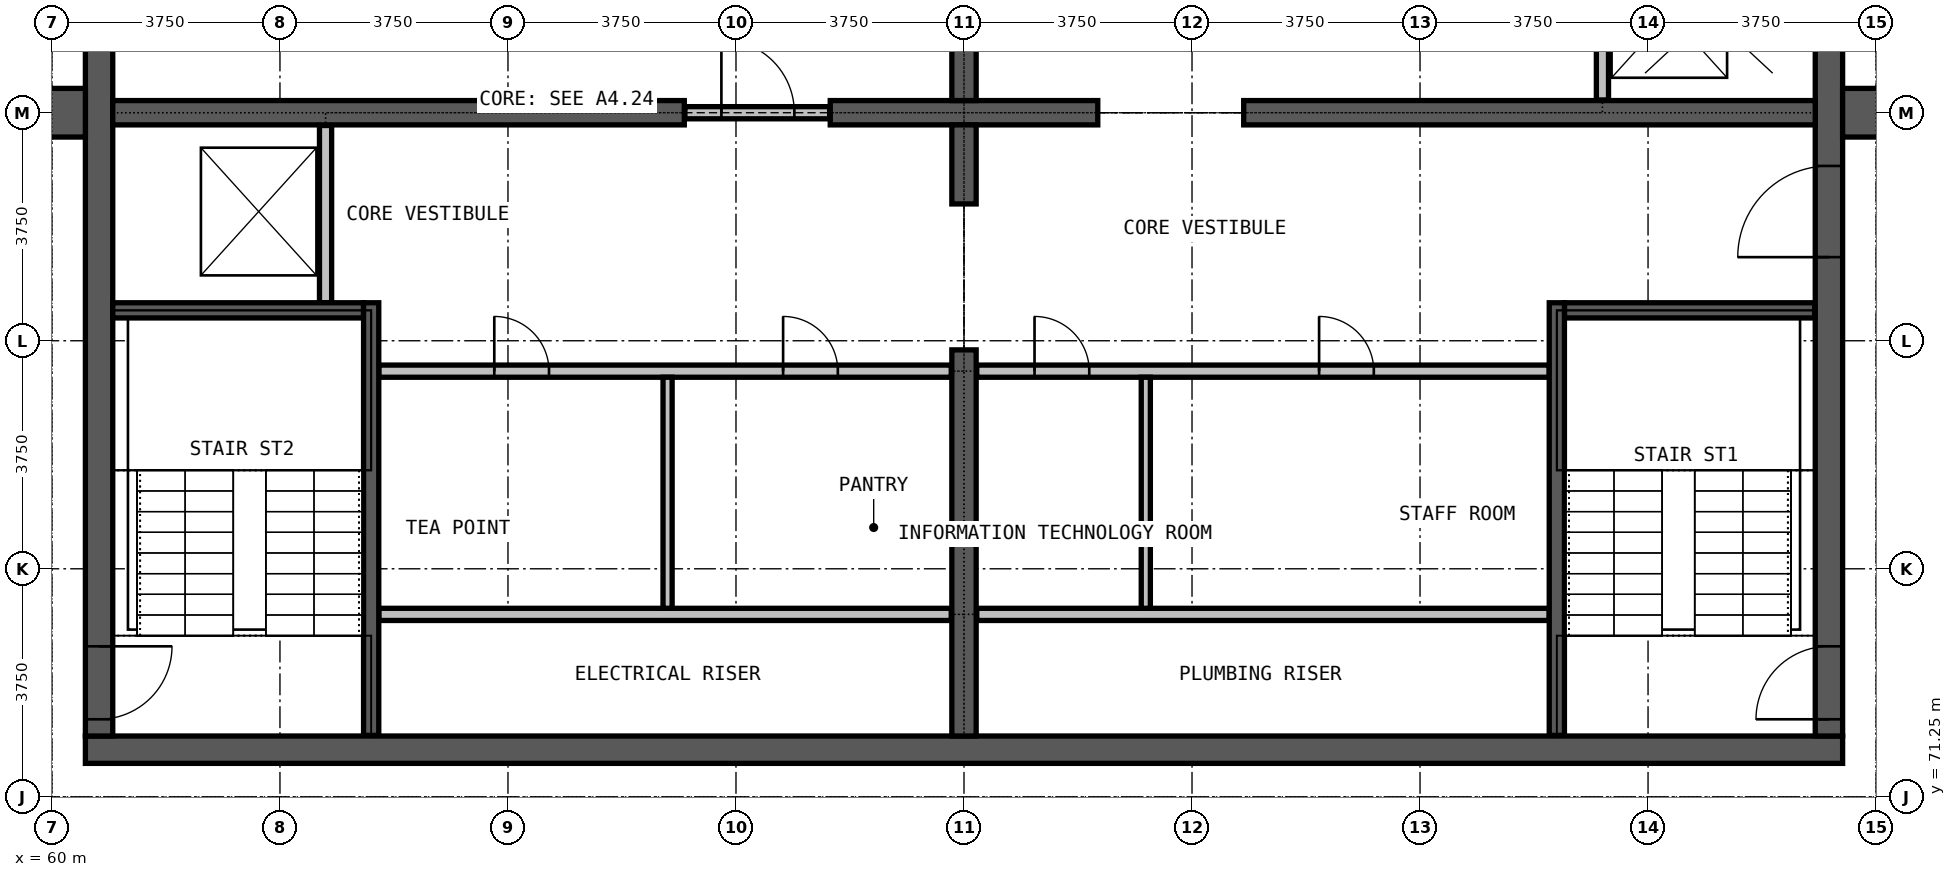
"""IFC4 building model, lengths in metres.
Left out: names, types, materials, properties, quantities, classifications, styles, units other than length and angle.
Written with IfcOpenShell. Run it as: python <this file> out.ifc"""

import sys

from ifc_helpers import new_model, si_unit, direction, frame, frame_2d, origin, place, context, subcontext, project, spatial, rectangle, extrude, element, fill, save


model = new_model("IFC4")
c1 = context("Model", 3, precision=1e-05, world=origin(), true_north=direction((0.0, 1.0)))
c2 = subcontext(c1, "Body", "Model", "MODEL_VIEW")
j1 = project(units=[si_unit("LENGTHUNIT", "METRE"), si_unit("PLANEANGLEUNIT", "RADIAN")], contexts=[c1])
p1 = place(None, origin())
s1 = spatial("IfcSite", under=j1, at=p1, CompositionType="ELEMENT")
p2 = place(p1, origin())
s2 = spatial("IfcBuilding", under=s1, at=p2, CompositionType="ELEMENT")
p3 = place(p2, frame((0.0, 0.0, 253.5)))
s3 = spatial("IfcBuildingStorey", under=s2, at=p3, CompositionType="ELEMENT", Elevation=253.5)
p4 = place(p3, frame((60.55, 72.025, 0.0), z_axis=(0.0, 0.0, 1.0), x_axis=(1.0, 0.0, 0.0)))
e1 = element("IfcWall", 1, at=p4, inside=s3, PredefinedType="SHEAR", context=c2, shape_type="SweptSolid", body=[
    extrude(rectangle(XDim=28.9, YDim=0.45, at=frame_2d((14.45, 0.0))), origin(), (0.0, 0.0, 1.0), 5.0),
])
p5 = place(p3, frame((89.225, 72.25, 0.0), z_axis=(0.0, 0.0, 1.0), x_axis=(0.0, 1.0, 0.0)))
e2 = element("IfcWall", 2, at=p5, inside=s3, PredefinedType="SHEAR", context=c2, shape_type="SweptSolid", body=[
    extrude(rectangle(XDim=20.5, YDim=0.45, at=frame_2d((10.25, 0.0))), origin(), (0.0, 0.0, 1.0), 5.0),
])
p6 = place(p5, frame((0.275, 0.0, 0.0)))
e3 = element("IfcOpeningElement", 3, at=p6, cuts=e2, PredefinedType="OPENING", context=c2, shape_type="SweptSolid", body=[
    extrude(rectangle(XDim=1.2, YDim=2.2, at=frame_2d((0.6, 1.1))), frame((0.0, 0.235, 0.0), z_axis=(0.0, -1.0, 0.0), x_axis=(1.0, 0.0, 0.0)), (0.0, 0.0, 1.0), 0.47),
])
p7 = place(p5, frame((13.775, 0.0, 0.0)))
e4 = element("IfcOpeningElement", 4, at=p7, cuts=e2, PredefinedType="OPENING", context=c2, shape_type="SweptSolid", body=[
    extrude(rectangle(XDim=1.2, YDim=2.2, at=frame_2d((0.6, 1.1))), frame((0.0, 0.235, 0.0), z_axis=(0.0, -1.0, 0.0), x_axis=(1.0, 0.0, 0.0)), (0.0, 0.0, 1.0), 0.47),
])
p8 = place(p5, frame((7.875, 0.0, 0.0)))
e5 = element("IfcOpeningElement", 5, at=p8, cuts=e2, PredefinedType="OPENING", context=c2, shape_type="SweptSolid", body=[
    extrude(rectangle(XDim=1.5, YDim=2.2, at=frame_2d((0.75, 1.1))), frame((0.0, 0.235, 0.0), z_axis=(0.0, -1.0, 0.0), x_axis=(1.0, 0.0, 0.0)), (0.0, 0.0, 1.0), 0.47),
])
p9 = place(p3, frame((60.775, 92.75, 0.0), z_axis=(0.0, 0.0, 1.0), x_axis=(0.0, -1.0, 0.0)))
e6 = element("IfcWall", 6, at=p9, inside=s3, PredefinedType="SHEAR", context=c2, shape_type="SweptSolid", body=[
    extrude(rectangle(XDim=20.5, YDim=0.45, at=frame_2d((10.25, 0.0))), origin(), (0.0, 0.0, 1.0), 5.0),
])
p10 = place(p9, frame((19.025, 0.0, 0.0)))
e7 = element("IfcOpeningElement", 7, at=p10, cuts=e6, PredefinedType="OPENING", context=c2, shape_type="SweptSolid", body=[
    extrude(rectangle(XDim=1.2, YDim=2.2, at=frame_2d((0.6, 1.1))), frame((0.0, 0.235, 0.0), z_axis=(0.0, -1.0, 0.0), x_axis=(1.0, 0.0, 0.0)), (0.0, 0.0, 1.0), 0.47),
])
p11 = place(p9, frame((8.025, 0.0, 0.0)))
e8 = element("IfcOpeningElement", 8, at=p11, cuts=e6, PredefinedType="OPENING", context=c2, shape_type="SweptSolid", body=[
    extrude(rectangle(XDim=1.2, YDim=2.2, at=frame_2d((0.6, 1.1))), frame((0.0, 0.235, 0.0), z_axis=(0.0, -1.0, 0.0), x_axis=(1.0, 0.0, 0.0)), (0.0, 0.0, 1.0), 0.47),
])
p12 = place(p3, frame((61.0, 82.5, 0.0), z_axis=(0.0, 0.0, 1.0), x_axis=(1.0, 0.0, 0.0)))
e9 = element("IfcWall", 9, at=p12, inside=s3, PredefinedType="SHEAR", context=c2, shape_type="SweptSolid", body=[
    extrude(rectangle(XDim=9.4, YDim=0.4, at=frame_2d((4.7, 0.0))), origin(), (0.0, 0.0, 1.0), 5.0),
])
p13 = place(p3, frame((72.8, 82.5, 0.0), z_axis=(0.0, 0.0, 1.0), x_axis=(1.0, 0.0, 0.0)))
e10 = element("IfcWall", 10, at=p13, inside=s3, PredefinedType="SHEAR", context=c2, shape_type="SweptSolid", body=[
    extrude(rectangle(XDim=4.4, YDim=0.4, at=frame_2d((2.2, 0.0))), origin(), (0.0, 0.0, 1.0), 5.0),
])
p14 = place(p3, frame((79.6, 82.5, 0.0), z_axis=(0.0, 0.0, 1.0), x_axis=(1.0, 0.0, 0.0)))
e11 = element("IfcWall", 11, at=p14, inside=s3, PredefinedType="SHEAR", context=c2, shape_type="SweptSolid", body=[
    extrude(rectangle(XDim=9.4, YDim=0.4, at=frame_2d((4.7, 0.0))), origin(), (0.0, 0.0, 1.0), 5.0),
])
p15 = place(p3, frame((75.0, 72.25, 0.0), z_axis=(0.0, 0.0, 1.0), x_axis=(0.0, 1.0, 0.0)))
e12 = element("IfcWall", 12, at=p15, inside=s3, PredefinedType="SHEAR", context=c2, shape_type="SweptSolid", body=[
    extrude(rectangle(XDim=6.35, YDim=0.4, at=frame_2d((3.175, 0.0))), origin(), (0.0, 0.0, 1.0), 5.0),
])
for number, where, z_axis, x_axis in (
    (13, (75.0, 81.0, 0.0), (0.0, 0.0, 1.0), (0.0, 1.0, 0.0)),
    (14, (75.0, 82.7, 0.0), (0.0, 0.0, 1.0), (0.0, 1.0, 0.0)),
):
    element("IfcWall", number, at=place(p3, frame(where, z_axis=z_axis, x_axis=x_axis)), inside=s3, PredefinedType="SHEAR", context=c2, shape_type="SweptSolid", body=[
        extrude(rectangle(XDim=1.3, YDim=0.4, at=frame_2d((0.65, 0.0))), origin(), (0.0, 0.0, 1.0), 5.0),
    ])
for number, where, z_axis, x_axis in (
    (15, (89.45, 82.5, 0.0), (0.0, 0.0, 1.0), (1.0, 0.0, 0.0)),
    (16, (57.95, 82.5, 0.0), (0.0, 0.0, 1.0), (1.0, 0.0, 0.0)),
):
    element("IfcWall", number, at=place(p3, frame(where, z_axis=z_axis, x_axis=x_axis)), inside=s3, PredefinedType="SHEAR", context=c2, shape_type="SweptSolid", body=[
        extrude(rectangle(XDim=2.6, YDim=0.8, at=frame_2d((1.3, 0.0))), origin(), (0.0, 0.0, 1.0), 4.7),
    ])
for number, where, z_axis, x_axis in (
    (17, (65.375, 74.25, 0.0), (0.0, 0.0, 1.0), (1.0, 0.0, 0.0)),
    (18, (75.21, 74.25, 0.0), (0.0, 0.0, 1.0), (1.0, 0.0, 0.0)),
):
    element("IfcWall", number, at=place(p3, frame(where, z_axis=z_axis, x_axis=x_axis)), inside=s3, PredefinedType="PARTITIONING", context=c2, shape_type="SweptSolid", body=[
        extrude(rectangle(XDim=9.415, YDim=0.2, at=frame_2d((4.708, 0.0))), origin(), (0.0, 0.0, 1.0), 4.7),
    ])
p16 = place(p3, frame((65.375, 78.25, 0.0), z_axis=(0.0, 0.0, 1.0), x_axis=(1.0, 0.0, 0.0)))
e19 = element("IfcWall", 19, at=p16, inside=s3, PredefinedType="PARTITIONING", context=c2, shape_type="SweptSolid", body=[
    extrude(rectangle(XDim=9.415, YDim=0.2, at=frame_2d((4.708, 0.0))), origin(), (0.0, 0.0, 1.0), 4.7),
])
p17 = place(p16, frame((1.9, 0.0, 0.0)))
e20 = element("IfcOpeningElement", 20, at=p17, cuts=e19, PredefinedType="OPENING", context=c2, shape_type="SweptSolid", body=[
    extrude(rectangle(XDim=0.9, YDim=2.2, at=frame_2d((0.45, 1.1))), frame((0.0, 0.11, 0.0), z_axis=(0.0, -1.0, 0.0), x_axis=(1.0, 0.0, 0.0)), (0.0, 0.0, 1.0), 0.22),
])
p18 = place(p16, frame((6.65, 0.0, 0.0)))
e21 = element("IfcOpeningElement", 21, at=p18, cuts=e19, PredefinedType="OPENING", context=c2, shape_type="SweptSolid", body=[
    extrude(rectangle(XDim=0.9, YDim=2.2, at=frame_2d((0.45, 1.1))), frame((0.0, 0.11, 0.0), z_axis=(0.0, -1.0, 0.0), x_axis=(1.0, 0.0, 0.0)), (0.0, 0.0, 1.0), 0.22),
])
p19 = place(p3, frame((75.21, 78.25, 0.0), z_axis=(0.0, 0.0, 1.0), x_axis=(1.0, 0.0, 0.0)))
e22 = element("IfcWall", 22, at=p19, inside=s3, PredefinedType="PARTITIONING", context=c2, shape_type="SweptSolid", body=[
    extrude(rectangle(XDim=9.415, YDim=0.2, at=frame_2d((4.708, 0.0))), origin(), (0.0, 0.0, 1.0), 4.7),
])
p20 = place(p19, frame((0.95, 0.0, 0.0)))
e23 = element("IfcOpeningElement", 23, at=p20, cuts=e22, PredefinedType="OPENING", context=c2, shape_type="SweptSolid", body=[
    extrude(rectangle(XDim=0.9, YDim=2.2, at=frame_2d((0.45, 1.1))), frame((0.0, 0.11, 0.0), z_axis=(0.0, -1.0, 0.0), x_axis=(1.0, 0.0, 0.0)), (0.0, 0.0, 1.0), 0.22),
])
p21 = place(p19, frame((5.63, 0.0, 0.0)))
e24 = element("IfcOpeningElement", 24, at=p21, cuts=e22, PredefinedType="OPENING", context=c2, shape_type="SweptSolid", body=[
    extrude(rectangle(XDim=0.9, YDim=2.2, at=frame_2d((0.45, 1.1))), frame((0.0, 0.11, 0.0), z_axis=(0.0, -1.0, 0.0), x_axis=(1.0, 0.0, 0.0)), (0.0, 0.0, 1.0), 0.22),
])
p22 = place(p3, frame((70.41, 82.5, 0.0), z_axis=(0.0, 0.0, 1.0), x_axis=(1.0, 0.0, 0.0)))
e25 = element("IfcWall", 25, at=p22, inside=s3, PredefinedType="PARTITIONING", context=c2, shape_type="SweptSolid", body=[
    extrude(rectangle(XDim=2.38, YDim=0.2, at=frame_2d((1.19, 0.0))), origin(), (0.0, 0.0, 1.0), 2.4),
])
p23 = place(p22, frame((0.6, 0.0, 0.0)))
e26 = element("IfcOpeningElement", 26, at=p23, cuts=e25, PredefinedType="OPENING", context=c2, shape_type="SweptSolid", body=[
    extrude(rectangle(XDim=1.2, YDim=2.2, at=frame_2d((0.6, 1.1))), frame((0.0, 0.11, 0.0), z_axis=(0.0, -1.0, 0.0), x_axis=(1.0, 0.0, 0.0)), (0.0, 0.0, 1.0), 0.22),
])
for number, where, z_axis, x_axis in (
    (27, (70.125, 74.35, 0.0), (0.0, 0.0, 1.0), (0.0, 1.0, 0.0)),
    (28, (77.99, 74.35, 0.0), (0.0, 0.0, 1.0), (0.0, 1.0, 0.0)),
):
    element("IfcWall", number, at=place(p3, frame(where, z_axis=z_axis, x_axis=x_axis)), inside=s3, PredefinedType="PARTITIONING", context=c2, shape_type="SweptSolid", body=[
        extrude(rectangle(XDim=3.8, YDim=0.15, at=frame_2d((1.9, 0.0))), origin(), (0.0, 0.0, 1.0), 4.7),
    ])
p24 = place(p3, frame((64.5, 79.375, 0.0), z_axis=(0.0, 0.0, 1.0), x_axis=(0.0, 1.0, 0.0)))
e29 = element("IfcWall", 29, at=p24, inside=s3, PredefinedType="PARTITIONING", context=c2, shape_type="SweptSolid", body=[
    extrude(rectangle(XDim=2.915, YDim=0.2, at=frame_2d((1.458, 0.0))), origin(), (0.0, 0.0, 1.0), 4.7),
])
p25 = place(p3, frame((85.5, 82.71, 0.0), z_axis=(0.0, 0.0, 1.0), x_axis=(0.0, 1.0, 0.0)))
e30 = element("IfcWall", 30, at=p25, inside=s3, PredefinedType="PARTITIONING", context=c2, shape_type="SweptSolid", body=[
    extrude(rectangle(XDim=2.915, YDim=0.2, at=frame_2d((1.458, 0.0))), origin(), (0.0, 0.0, 1.0), 4.7),
])
p26 = place(p25, frame((0.9, 0.0, 0.0)))
e31 = element("IfcOpeningElement", 31, at=p26, cuts=e30, PredefinedType="OPENING", context=c2, shape_type="SweptSolid", body=[
    extrude(rectangle(XDim=1.1, YDim=2.2, at=frame_2d((0.55, 1.1))), frame((0.0, 0.11, 0.0), z_axis=(0.0, -1.0, 0.0), x_axis=(1.0, 0.0, 0.0)), (0.0, 0.0, 1.0), 0.22),
])
p27 = place(p3, frame((61.0, 79.25, 0.0), z_axis=(0.0, 0.0, 1.0), x_axis=(1.0, 0.0, 0.0)))
e32 = element("IfcWall", 32, at=p27, inside=s3, PredefinedType="PARTITIONING", context=c2, shape_type="SweptSolid", body=[
    extrude(rectangle(XDim=4.125, YDim=0.25, at=frame_2d((2.062, 0.0))), origin(), (0.0, 0.0, 1.0), 4.7),
])
p28 = place(p3, frame((84.875, 79.25, 0.0), z_axis=(0.0, 0.0, 1.0), x_axis=(1.0, 0.0, 0.0)))
e33 = element("IfcWall", 33, at=p28, inside=s3, PredefinedType="PARTITIONING", context=c2, shape_type="SweptSolid", body=[
    extrude(rectangle(XDim=4.115, YDim=0.25, at=frame_2d((2.058, 0.0))), origin(), (0.0, 0.0, 1.0), 4.7),
])
for number, where, z_axis, x_axis in (
    (34, (65.25, 72.26, 0.0), (0.0, 0.0, 1.0), (0.0, 1.0, 0.0)),
    (35, (84.75, 72.26, 0.0), (0.0, 0.0, 1.0), (0.0, 1.0, 0.0)),
):
    element("IfcWall", number, at=place(p3, frame(where, z_axis=z_axis, x_axis=x_axis)), inside=s3, PredefinedType="PARTITIONING", context=c2, shape_type="SweptSolid", body=[
        extrude(rectangle(XDim=7.115, YDim=0.25, at=frame_2d((3.558, 0.0))), origin(), (0.0, 0.0, 1.0), 4.7),
    ])
p29 = place(p23, origin())
e36 = element("IfcDoor", 36, at=p29, inside=s3, OperationType="SINGLE_SWING_LEFT", PredefinedType="DOOR", context=c2, shape_type="SweptSolid", body=[
    extrude(rectangle(XDim=1.2, YDim=2.2, at=frame_2d((0.6, 1.1))), frame((0.0, 0.025, 0.0), z_axis=(0.0, -1.0, 0.0), x_axis=(1.0, 0.0, 0.0)), (0.0, 0.0, 1.0), 0.05),
])
fill(e26, e36)
p30 = place(p6, origin())
e37 = element("IfcDoor", 37, at=p30, inside=s3, OperationType="SINGLE_SWING_RIGHT", PredefinedType="DOOR", context=c2, shape_type="SweptSolid", body=[
    extrude(rectangle(XDim=1.2, YDim=2.2, at=frame_2d((0.6, 1.1))), frame((0.0, 0.025, 0.0), z_axis=(0.0, -1.0, 0.0), x_axis=(1.0, 0.0, 0.0)), (0.0, 0.0, 1.0), 0.05),
])
fill(e3, e37)
p31 = place(p10, origin())
e38 = element("IfcDoor", 38, at=p31, inside=s3, OperationType="SINGLE_SWING_LEFT", PredefinedType="DOOR", context=c2, shape_type="SweptSolid", body=[
    extrude(rectangle(XDim=1.2, YDim=2.2, at=frame_2d((0.6, 1.1))), frame((0.0, 0.025, 0.0), z_axis=(0.0, -1.0, 0.0), x_axis=(1.0, 0.0, 0.0)), (0.0, 0.0, 1.0), 0.05),
])
fill(e7, e38)
p32 = place(p8, origin())
e39 = element("IfcDoor", 39, at=p32, inside=s3, OperationType="DOUBLE_DOOR_SINGLE_SWING", PredefinedType="DOOR", context=c2, shape_type="SweptSolid", body=[
    extrude(rectangle(XDim=1.5, YDim=2.2, at=frame_2d((0.75, 1.1))), frame((0.0, 0.025, 0.0), z_axis=(0.0, -1.0, 0.0), x_axis=(1.0, 0.0, 0.0)), (0.0, 0.0, 1.0), 0.05),
])
fill(e5, e39)
p33 = place(p17, origin())
e40 = element("IfcDoor", 40, at=p33, inside=s3, OperationType="SINGLE_SWING_LEFT", PredefinedType="DOOR", context=c2, shape_type="SweptSolid", body=[
    extrude(rectangle(XDim=0.9, YDim=2.2, at=frame_2d((0.45, 1.1))), frame((0.0, 0.025, 0.0), z_axis=(0.0, -1.0, 0.0), x_axis=(1.0, 0.0, 0.0)), (0.0, 0.0, 1.0), 0.05),
])
fill(e20, e40)
p34 = place(p18, origin())
e41 = element("IfcDoor", 41, at=p34, inside=s3, OperationType="SINGLE_SWING_RIGHT", PredefinedType="DOOR", context=c2, shape_type="SweptSolid", body=[
    extrude(rectangle(XDim=0.9, YDim=2.2, at=frame_2d((0.45, 1.1))), frame((0.0, 0.025, 0.0), z_axis=(0.0, -1.0, 0.0), x_axis=(1.0, 0.0, 0.0)), (0.0, 0.0, 1.0), 0.05),
])
fill(e21, e41)
p35 = place(p20, origin())
e42 = element("IfcDoor", 42, at=p35, inside=s3, OperationType="SINGLE_SWING_LEFT", PredefinedType="DOOR", context=c2, shape_type="SweptSolid", body=[
    extrude(rectangle(XDim=0.9, YDim=2.2, at=frame_2d((0.45, 1.1))), frame((0.0, 0.025, 0.0), z_axis=(0.0, -1.0, 0.0), x_axis=(1.0, 0.0, 0.0)), (0.0, 0.0, 1.0), 0.05),
])
fill(e23, e42)
p36 = place(p21, origin())
e43 = element("IfcDoor", 43, at=p36, inside=s3, OperationType="SINGLE_SWING_RIGHT", PredefinedType="DOOR", context=c2, shape_type="SweptSolid", body=[
    extrude(rectangle(XDim=0.9, YDim=2.2, at=frame_2d((0.45, 1.1))), frame((0.0, 0.025, 0.0), z_axis=(0.0, -1.0, 0.0), x_axis=(1.0, 0.0, 0.0)), (0.0, 0.0, 1.0), 0.05),
])
fill(e24, e43)
save(model, sys.argv[1])
